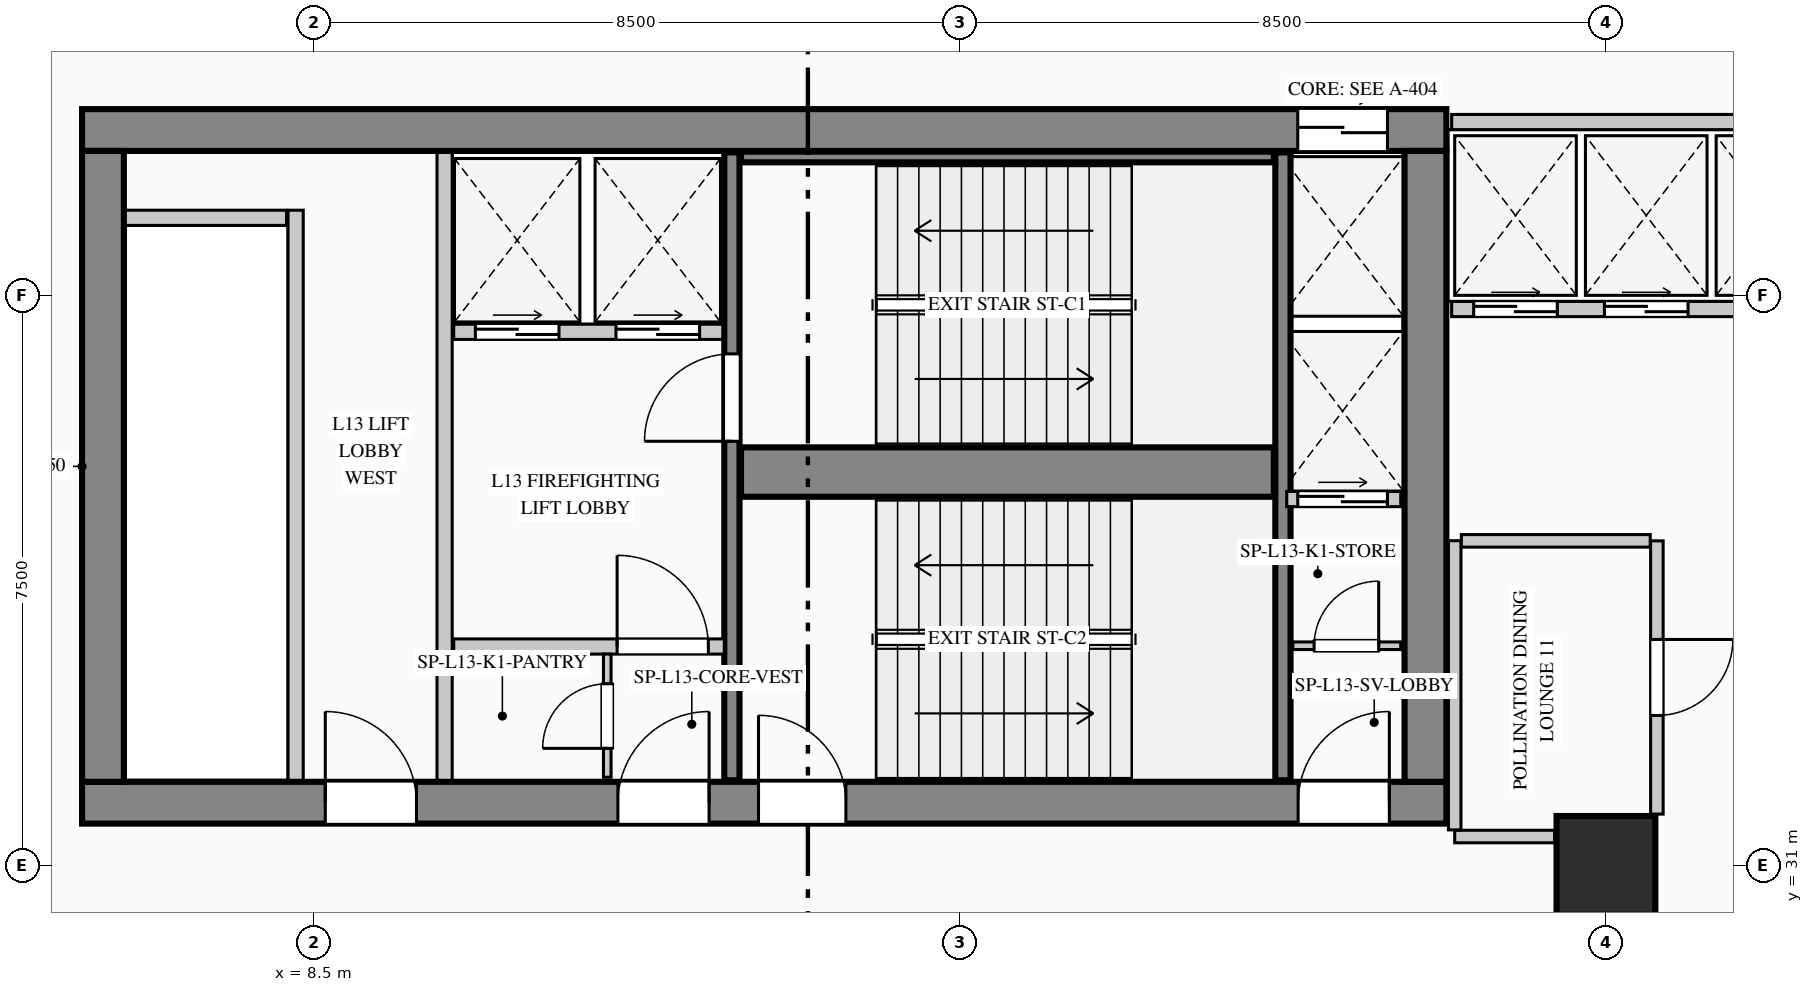
"""IFC4 building model, lengths in metres.
Left out: names, types, materials, properties, quantities, classifications, styles, units other than length and angle.
Written with IfcOpenShell. Run it as: python <this file> out.ifc"""

import sys

from ifc_helpers import new_model, si_unit, direction, frame, frame_2d, origin, origin_2d, place, context, subcontext, project, spatial, rectangle, extrude, element, fill, save


model = new_model("IFC4")
c1 = context("Model", 3, precision=1e-05, world=origin(), true_north=direction((0.0, 1.0)))
c2 = subcontext(c1, "Body", "Model", "MODEL_VIEW")
j1 = project(units=[si_unit("LENGTHUNIT", "METRE"), si_unit("PLANEANGLEUNIT", "RADIAN")], contexts=[c1])
p1 = place(None, origin())
s1 = spatial("IfcSite", under=j1, at=p1, CompositionType="ELEMENT")
p2 = place(p1, origin())
s2 = spatial("IfcBuilding", under=s1, at=p2, CompositionType="ELEMENT")
p3 = place(p2, frame((0.0, 0.0, 57.8)))
s3 = spatial("IfcBuildingStorey", under=s2, at=p3, CompositionType="ELEMENT", Elevation=57.8)
p4 = place(p3, frame((5.45, 40.675, 0.0), z_axis=(0.0, 0.0, 1.0), x_axis=(1.0, 0.0, 0.0)))
e1 = element("IfcWall", 1, at=p4, inside=s3, PredefinedType="SHEAR", context=c2, shape_type="SweptSolid", body=[
    extrude(rectangle(XDim=17.95, YDim=0.55, at=frame_2d((8.975, 0.0))), origin(), (0.0, 0.0, 1.0), 4.4),
])
p5 = place(p4, frame((15.995, 0.0, 0.0)))
e2 = element("IfcOpeningElement", 2, at=p5, cuts=e1, PredefinedType="OPENING", context=c2, shape_type="SweptSolid", body=[
    extrude(rectangle(XDim=1.18, YDim=2.25, at=frame_2d((0.59, 1.125))), frame((0.0, 0.285, 0.0), z_axis=(0.0, -1.0, 0.0), x_axis=(1.0, 0.0, 0.0)), (0.0, 0.0, 1.0), 0.57),
])
p6 = place(p3, frame((5.45, 31.825, 0.0), z_axis=(0.0, 0.0, 1.0), x_axis=(1.0, 0.0, 0.0)))
e3 = element("IfcWall", 3, at=p6, inside=s3, PredefinedType="SHEAR", context=c2, shape_type="SweptSolid", body=[
    extrude(rectangle(XDim=17.95, YDim=0.55, at=frame_2d((8.975, 0.0))), origin(), (0.0, 0.0, 1.0), 4.4),
])
p7 = place(p6, frame((3.2, 0.0, 0.0)))
e4 = element("IfcOpeningElement", 4, at=p7, cuts=e3, PredefinedType="OPENING", context=c2, shape_type="SweptSolid", body=[
    extrude(rectangle(XDim=1.2, YDim=2.2, at=frame_2d((0.6, 1.1))), frame((0.0, 0.285, 0.0), z_axis=(0.0, -1.0, 0.0), x_axis=(1.0, 0.0, 0.0)), (0.0, 0.0, 1.0), 0.57),
])
p8 = place(p6, frame((7.05, 0.0, 0.0)))
e5 = element("IfcOpeningElement", 5, at=p8, cuts=e3, PredefinedType="OPENING", context=c2, shape_type="SweptSolid", body=[
    extrude(rectangle(XDim=1.2, YDim=2.2, at=frame_2d((0.6, 1.1))), frame((0.0, 0.285, 0.0), z_axis=(0.0, -1.0, 0.0), x_axis=(1.0, 0.0, 0.0)), (0.0, 0.0, 1.0), 0.57),
])
p9 = place(p6, frame((8.9, 0.0, 0.0)))
e6 = element("IfcOpeningElement", 6, at=p9, cuts=e3, PredefinedType="OPENING", context=c2, shape_type="SweptSolid", body=[
    extrude(rectangle(XDim=1.15, YDim=2.2, at=frame_2d((0.575, 1.1))), frame((0.0, 0.285, 0.0), z_axis=(0.0, -1.0, 0.0), x_axis=(1.0, 0.0, 0.0)), (0.0, 0.0, 1.0), 0.57),
])
p10 = place(p6, frame((16.0, 0.0, 0.0)))
e7 = element("IfcOpeningElement", 7, at=p10, cuts=e3, PredefinedType="OPENING", context=c2, shape_type="SweptSolid", body=[
    extrude(rectangle(XDim=1.2, YDim=2.2, at=frame_2d((0.6, 1.1))), frame((0.0, 0.285, 0.0), z_axis=(0.0, -1.0, 0.0), x_axis=(1.0, 0.0, 0.0)), (0.0, 0.0, 1.0), 0.57),
])
for number, where, z_axis, x_axis in (
    (8, (5.725, 32.1, 0.0), (0.0, 0.0, 1.0), (0.0, 1.0, 0.0)),
    (9, (23.125, 32.1, 0.0), (0.0, 0.0, 1.0), (0.0, 1.0, 0.0)),
):
    element("IfcWall", number, at=place(p3, frame(where, z_axis=z_axis, x_axis=x_axis)), inside=s3, PredefinedType="SHEAR", context=c2, shape_type="SweptSolid", body=[
        extrude(rectangle(XDim=8.3, YDim=0.55, at=frame_2d((4.15, 0.0))), origin(), (0.0, 0.0, 1.0), 4.4),
    ])
p11 = place(p3, frame((14.0, 32.12, 0.0), z_axis=(0.0, 0.0, 1.0), x_axis=(0.0, 1.0, 0.0)))
e10 = element("IfcWall", 10, at=p11, inside=s3, PredefinedType="SHEAR", context=c2, shape_type="SweptSolid", body=[
    extrude(rectangle(XDim=8.26, YDim=0.2, at=frame_2d((4.13, 0.0))), origin(), (0.0, 0.0, 1.0), 4.4),
])
p12 = place(p11, frame((4.46, 0.0, 0.0)))
e11 = element("IfcOpeningElement", 11, at=p12, cuts=e10, PredefinedType="OPENING", context=c2, shape_type="SweptSolid", body=[
    extrude(rectangle(XDim=1.15, YDim=2.2, at=frame_2d((0.575, 1.1))), frame((0.0, 0.11, 0.0), z_axis=(0.0, -1.0, 0.0), x_axis=(1.0, 0.0, 0.0)), (0.0, 0.0, 1.0), 0.22),
])
p13 = place(p3, frame((14.12, 36.175, 0.0), z_axis=(0.0, 0.0, 1.0), x_axis=(1.0, 0.0, 0.0)))
e12 = element("IfcWall", 12, at=p13, inside=s3, PredefinedType="SHEAR", context=c2, shape_type="SweptSolid", body=[
    extrude(rectangle(XDim=7.01, YDim=0.65, at=frame_2d((3.505, 0.0))), origin(), (0.0, 0.0, 1.0), 4.4),
])
p14 = place(p3, frame((21.25, 32.12, 0.0), z_axis=(0.0, 0.0, 1.0), x_axis=(0.0, 1.0, 0.0)))
e13 = element("IfcWall", 13, at=p14, inside=s3, PredefinedType="SHEAR", context=c2, shape_type="SweptSolid", body=[
    extrude(rectangle(XDim=8.26, YDim=0.2, at=frame_2d((4.13, 0.0))), origin(), (0.0, 0.0, 1.0), 4.4),
])
p15 = place(p3, frame((14.12, 40.32, 0.0), z_axis=(0.0, 0.0, 1.0), x_axis=(1.0, 0.0, 0.0)))
e14 = element("IfcWall", 14, at=p15, inside=s3, PredefinedType="SHEAR", context=c2, shape_type="SweptSolid", body=[
    extrude(rectangle(XDim=7.01, YDim=0.14, at=frame_2d((3.505, 0.0))), origin(), (0.0, 0.0, 1.0), 4.4),
])
p16 = place(p3, frame((25.5, 31.0, 0.0), z_axis=(0.0, 0.0, 1.0), x_axis=(1.0, 0.0, 0.0)))
e15 = element("IfcColumn", 15, at=p16, inside=s3, PredefinedType="COLUMN", context=c2, shape_type="SweptSolid", body=[
    extrude(rectangle(XDim=1.3, YDim=1.3, at=origin_2d()), origin(), (0.0, 0.0, 1.0), 4.4),
])
p17 = place(p3, frame((8.523, 4.84, 0.0), z_axis=(0.0, 0.0, 1.0), x_axis=(-0.150394554312, 0.988626055712, 0.0)))
e16 = element("IfcWall", 16, at=p17, inside=s3, PredefinedType="STANDARD", context=c2, shape_type="SweptSolid", body=[
    extrude(rectangle(XDim=36.738, YDim=0.28, at=frame_2d((18.369, 0.0))), origin(), (0.0, 0.0, 1.0), 4.1),
])
p18 = place(p17, frame((22.762, 0.0, 0.9)))
e17 = element("IfcOpeningElement", 17, at=p18, cuts=e16, PredefinedType="OPENING", context=c2, shape_type="SweptSolid", body=[
    extrude(rectangle(XDim=1.5, YDim=1.8, at=frame_2d((0.75, 0.9))), frame((0.0, 0.15, 0.0), z_axis=(0.0, -1.0, 0.0), x_axis=(1.0, 0.0, 0.0)), (0.0, 0.0, 1.0), 0.3),
])
p19 = place(p3, frame((8.26, 32.12, 0.0), z_axis=(0.0, 0.0, 1.0), x_axis=(0.0, 1.0, 0.0)))
e18 = element("IfcWall", 18, at=p19, inside=s3, PredefinedType="PARTITIONING", context=c2, shape_type="SweptSolid", body=[
    extrude(rectangle(XDim=7.5, YDim=0.2, at=frame_2d((3.75, 0.0))), origin(), (0.0, 0.0, 1.0), 4.1),
])
p20 = place(p3, frame((6.02, 39.52, 0.0), z_axis=(0.0, 0.0, 1.0), x_axis=(1.0, 0.0, 0.0)))
e19 = element("IfcWall", 19, at=p20, inside=s3, PredefinedType="PARTITIONING", context=c2, shape_type="SweptSolid", body=[
    extrude(rectangle(XDim=2.12, YDim=0.2, at=frame_2d((1.06, 0.0))), origin(), (0.0, 0.0, 1.0), 4.1),
])
p21 = place(p3, frame((10.22, 32.12, 0.0), z_axis=(0.0, 0.0, 1.0), x_axis=(0.0, 1.0, 0.0)))
e20 = element("IfcWall", 20, at=p21, inside=s3, PredefinedType="PARTITIONING", context=c2, shape_type="SweptSolid", body=[
    extrude(rectangle(XDim=8.26, YDim=0.2, at=frame_2d((4.13, 0.0))), origin(), (0.0, 0.0, 1.0), 4.1),
])
p22 = place(p3, frame((10.34, 38.02, 0.0), z_axis=(0.0, 0.0, 1.0), x_axis=(1.0, 0.0, 0.0)))
e21 = element("IfcWall", 21, at=p22, inside=s3, PredefinedType="PARTITIONING", context=c2, shape_type="SweptSolid", body=[
    extrude(rectangle(XDim=3.54, YDim=0.2, at=frame_2d((1.77, 0.0))), origin(), (0.0, 0.0, 1.0), 4.1),
])
p23 = place(p22, frame((0.285, 0.0, 0.0)))
e22 = element("IfcOpeningElement", 22, at=p23, cuts=e21, PredefinedType="OPENING", context=c2, shape_type="SweptSolid", body=[
    extrude(rectangle(XDim=1.1, YDim=2.2, at=frame_2d((0.55, 1.1))), frame((0.0, 0.11, 0.0), z_axis=(0.0, -1.0, 0.0), x_axis=(1.0, 0.0, 0.0)), (0.0, 0.0, 1.0), 0.22),
])
p24 = place(p22, frame((2.135, 0.0, 0.0)))
e23 = element("IfcOpeningElement", 23, at=p24, cuts=e21, PredefinedType="OPENING", context=c2, shape_type="SweptSolid", body=[
    extrude(rectangle(XDim=1.1, YDim=2.2, at=frame_2d((0.55, 1.1))), frame((0.0, 0.11, 0.0), z_axis=(0.0, -1.0, 0.0), x_axis=(1.0, 0.0, 0.0)), (0.0, 0.0, 1.0), 0.22),
])
p25 = place(p3, frame((10.34, 33.88, 0.0), z_axis=(0.0, 0.0, 1.0), x_axis=(1.0, 0.0, 0.0)))
e24 = element("IfcWall", 24, at=p25, inside=s3, PredefinedType="PARTITIONING", context=c2, shape_type="SweptSolid", body=[
    extrude(rectangle(XDim=3.56, YDim=0.2, at=frame_2d((1.78, 0.0))), origin(), (0.0, 0.0, 1.0), 4.1),
])
p26 = place(p25, frame((2.15, 0.0, 0.0)))
e25 = element("IfcOpeningElement", 25, at=p26, cuts=e24, PredefinedType="OPENING", context=c2, shape_type="SweptSolid", body=[
    extrude(rectangle(XDim=1.2, YDim=2.2, at=frame_2d((0.6, 1.1))), frame((0.0, 0.11, 0.0), z_axis=(0.0, -1.0, 0.0), x_axis=(1.0, 0.0, 0.0)), (0.0, 0.0, 1.0), 0.22),
])
p27 = place(p3, frame((12.36, 32.16, 0.0), z_axis=(0.0, 0.0, 1.0), x_axis=(0.0, 1.0, 0.0)))
e26 = element("IfcWall", 26, at=p27, inside=s3, PredefinedType="PARTITIONING", context=c2, shape_type="SweptSolid", body=[
    extrude(rectangle(XDim=1.62, YDim=0.1, at=frame_2d((0.81, 0.0))), origin(), (0.0, 0.0, 1.0), 4.1),
])
p28 = place(p27, frame((0.38, 0.0, 0.0)))
e27 = element("IfcOpeningElement", 27, at=p28, cuts=e26, PredefinedType="OPENING", context=c2, shape_type="SweptSolid", body=[
    extrude(rectangle(XDim=0.85, YDim=2.1, at=frame_2d((0.425, 1.05))), frame((0.0, 0.06, 0.0), z_axis=(0.0, -1.0, 0.0), x_axis=(1.0, 0.0, 0.0)), (0.0, 0.0, 1.0), 0.12),
])
p29 = place(p3, frame((21.38, 33.89, 0.0), z_axis=(0.0, 0.0, 1.0), x_axis=(1.0, 0.0, 0.0)))
e28 = element("IfcWall", 28, at=p29, inside=s3, PredefinedType="PARTITIONING", context=c2, shape_type="SweptSolid", body=[
    extrude(rectangle(XDim=1.42, YDim=0.1, at=frame_2d((0.71, 0.0))), origin(), (0.0, 0.0, 1.0), 4.1),
])
p30 = place(p29, frame((0.28, 0.0, 0.0)))
e29 = element("IfcOpeningElement", 29, at=p30, cuts=e28, PredefinedType="OPENING", context=c2, shape_type="SweptSolid", body=[
    extrude(rectangle(XDim=0.85, YDim=2.1, at=frame_2d((0.425, 1.05))), frame((0.0, 0.06, 0.0), z_axis=(0.0, -1.0, 0.0), x_axis=(1.0, 0.0, 0.0)), (0.0, 0.0, 1.0), 0.12),
])
p31 = place(p3, frame((21.3, 35.82, 0.0), z_axis=(0.0, 0.0, 1.0), x_axis=(1.0, 0.0, 0.0)))
e30 = element("IfcWall", 30, at=p31, inside=s3, PredefinedType="PARTITIONING", context=c2, shape_type="SweptSolid", body=[
    extrude(rectangle(XDim=1.5, YDim=0.2, at=frame_2d((0.75, 0.0))), origin(), (0.0, 0.0, 1.0), 4.1),
])
p32 = place(p31, frame((0.145, 0.0, 0.0)))
e31 = element("IfcOpeningElement", 31, at=p32, cuts=e30, PredefinedType="OPENING", context=c2, shape_type="SweptSolid", body=[
    extrude(rectangle(XDim=1.18, YDim=2.25, at=frame_2d((0.59, 1.125))), frame((0.0, 0.11, 0.0), z_axis=(0.0, -1.0, 0.0), x_axis=(1.0, 0.0, 0.0)), (0.0, 0.0, 1.0), 0.22),
])
p33 = place(p3, frame((23.47, 40.78, 0.0), z_axis=(0.0, 0.0, 1.0), x_axis=(1.0, 0.0, 0.0)))
e32 = element("IfcWall", 32, at=p33, inside=s3, PredefinedType="PARTITIONING", context=c2, shape_type="SweptSolid", body=[
    extrude(rectangle(XDim=6.91, YDim=0.2, at=frame_2d((3.455, 0.0))), origin(), (0.0, 0.0, 1.0), 4.1),
])
p34 = place(p3, frame((23.47, 38.32, 0.0), z_axis=(0.0, 0.0, 1.0), x_axis=(1.0, 0.0, 0.0)))
e33 = element("IfcWall", 33, at=p34, inside=s3, PredefinedType="PARTITIONING", context=c2, shape_type="SweptSolid", body=[
    extrude(rectangle(XDim=6.79, YDim=0.2, at=frame_2d((3.395, 0.0))), origin(), (0.0, 0.0, 1.0), 4.1),
])
p35 = place(p34, frame((0.29, 0.0, 0.0)))
e34 = element("IfcOpeningElement", 34, at=p35, cuts=e33, PredefinedType="OPENING", context=c2, shape_type="SweptSolid", body=[
    extrude(rectangle(XDim=1.1, YDim=2.2, at=frame_2d((0.55, 1.1))), frame((0.0, 0.11, 0.0), z_axis=(0.0, -1.0, 0.0), x_axis=(1.0, 0.0, 0.0)), (0.0, 0.0, 1.0), 0.22),
])
p36 = place(p34, frame((2.01, 0.0, 0.0)))
e35 = element("IfcOpeningElement", 35, at=p36, cuts=e33, PredefinedType="OPENING", context=c2, shape_type="SweptSolid", body=[
    extrude(rectangle(XDim=1.1, YDim=2.2, at=frame_2d((0.55, 1.1))), frame((0.0, 0.11, 0.0), z_axis=(0.0, -1.0, 0.0), x_axis=(1.0, 0.0, 0.0)), (0.0, 0.0, 1.0), 0.22),
])
p37 = place(p34, frame((3.73, 0.0, 0.0)))
e36 = element("IfcOpeningElement", 36, at=p37, cuts=e33, PredefinedType="OPENING", context=c2, shape_type="SweptSolid", body=[
    extrude(rectangle(XDim=1.1, YDim=2.2, at=frame_2d((0.55, 1.1))), frame((0.0, 0.11, 0.0), z_axis=(0.0, -1.0, 0.0), x_axis=(1.0, 0.0, 0.0)), (0.0, 0.0, 1.0), 0.22),
])
p38 = place(p34, frame((5.45, 0.0, 0.0)))
e37 = element("IfcOpeningElement", 37, at=p38, cuts=e33, PredefinedType="OPENING", context=c2, shape_type="SweptSolid", body=[
    extrude(rectangle(XDim=1.1, YDim=2.2, at=frame_2d((0.55, 1.1))), frame((0.0, 0.11, 0.0), z_axis=(0.0, -1.0, 0.0), x_axis=(1.0, 0.0, 0.0)), (0.0, 0.0, 1.0), 0.22),
])
p39 = place(p3, frame((26.17, 35.27, 0.0), z_axis=(0.0, 0.0, 1.0), x_axis=(0.0, -1.0, 0.0)))
e38 = element("IfcWall", 38, at=p39, inside=s3, PredefinedType="PARTITIONING", context=c2, shape_type="SweptSolid", body=[
    extrude(rectangle(XDim=3.595, YDim=0.165, at=frame_2d((1.797, 0.0))), origin(), (0.0, 0.0, 1.0), 4.1),
])
p40 = place(p39, frame((1.298, 0.0, 0.0)))
e39 = element("IfcOpeningElement", 39, at=p40, cuts=e38, PredefinedType="OPENING", context=c2, shape_type="SweptSolid", body=[
    extrude(rectangle(XDim=1.0, YDim=2.15, at=frame_2d((0.5, 1.075))), frame((0.0, 0.093, 0.0), z_axis=(0.0, -1.0, 0.0), x_axis=(1.0, 0.0, 0.0)), (0.0, 0.0, 1.0), 0.185),
])
p41 = place(p3, frame((24.825, 31.38, 0.0), z_axis=(0.0, 0.0, 1.0), x_axis=(-1.0, 0.0, 0.0)))
e40 = element("IfcWall", 40, at=p41, inside=s3, PredefinedType="PARTITIONING", context=c2, shape_type="SweptSolid", body=[
    extrude(rectangle(XDim=1.315, YDim=0.165, at=frame_2d((0.657, 0.0))), origin(), (0.0, 0.0, 1.0), 4.1),
])
p42 = place(p3, frame((23.51, 31.468, 0.0), z_axis=(0.0, 0.0, 1.0), x_axis=(0.0, 1.0, 0.0)))
e41 = element("IfcWall", 41, at=p42, inside=s3, PredefinedType="PARTITIONING", context=c2, shape_type="SweptSolid", body=[
    extrude(rectangle(XDim=3.804, YDim=0.165, at=frame_2d((1.902, 0.0))), origin(), (0.0, 0.0, 1.0), 4.1),
])
p43 = place(p3, frame((23.597, 35.27, 0.0), z_axis=(0.0, 0.0, 1.0), x_axis=(1.0, 0.0, 0.0)))
e42 = element("IfcWall", 42, at=p43, inside=s3, PredefinedType="PARTITIONING", context=c2, shape_type="SweptSolid", body=[
    extrude(rectangle(XDim=2.485, YDim=0.165, at=frame_2d((1.243, 0.0))), origin(), (0.0, 0.0, 1.0), 4.1),
])
p44 = place(p7, origin())
e43 = element("IfcDoor", 43, at=p44, inside=s3, OperationType="SINGLE_SWING_LEFT", PredefinedType="DOOR", context=c2, shape_type="SweptSolid", body=[
    extrude(rectangle(XDim=1.2, YDim=2.2, at=frame_2d((0.6, 1.1))), frame((0.0, 0.025, 0.0), z_axis=(0.0, -1.0, 0.0), x_axis=(1.0, 0.0, 0.0)), (0.0, 0.0, 1.0), 0.05),
])
fill(e4, e43)
p45 = place(p8, origin())
e44 = element("IfcDoor", 44, at=p45, inside=s3, OperationType="SINGLE_SWING_RIGHT", PredefinedType="DOOR", context=c2, shape_type="SweptSolid", body=[
    extrude(rectangle(XDim=1.2, YDim=2.2, at=frame_2d((0.6, 1.1))), frame((0.0, 0.025, 0.0), z_axis=(0.0, -1.0, 0.0), x_axis=(1.0, 0.0, 0.0)), (0.0, 0.0, 1.0), 0.05),
])
fill(e5, e44)
p46 = place(p9, origin())
e45 = element("IfcDoor", 45, at=p46, inside=s3, OperationType="SINGLE_SWING_LEFT", PredefinedType="DOOR", context=c2, shape_type="SweptSolid", body=[
    extrude(rectangle(XDim=1.15, YDim=2.2, at=frame_2d((0.575, 1.1))), frame((0.0, 0.025, 0.0), z_axis=(0.0, -1.0, 0.0), x_axis=(1.0, 0.0, 0.0)), (0.0, 0.0, 1.0), 0.05),
])
fill(e6, e45)
p47 = place(p10, origin())
e46 = element("IfcDoor", 46, at=p47, inside=s3, OperationType="SINGLE_SWING_RIGHT", PredefinedType="DOOR", context=c2, shape_type="SweptSolid", body=[
    extrude(rectangle(XDim=1.2, YDim=2.2, at=frame_2d((0.6, 1.1))), frame((0.0, 0.025, 0.0), z_axis=(0.0, -1.0, 0.0), x_axis=(1.0, 0.0, 0.0)), (0.0, 0.0, 1.0), 0.05),
])
fill(e7, e46)
p48 = place(p26, origin())
e47 = element("IfcDoor", 47, at=p48, inside=s3, OperationType="SINGLE_SWING_LEFT", PredefinedType="DOOR", context=c2, shape_type="SweptSolid", body=[
    extrude(rectangle(XDim=1.2, YDim=2.2, at=frame_2d((0.6, 1.1))), frame((0.0, 0.025, 0.0), z_axis=(0.0, -1.0, 0.0), x_axis=(1.0, 0.0, 0.0)), (0.0, 0.0, 1.0), 0.05),
])
fill(e25, e47)
p49 = place(p28, origin())
e48 = element("IfcDoor", 48, at=p49, inside=s3, OperationType="SINGLE_SWING_LEFT", PredefinedType="DOOR", context=c2, shape_type="SweptSolid", body=[
    extrude(rectangle(XDim=0.85, YDim=2.1, at=frame_2d((0.425, 1.05))), frame((0.0, 0.025, 0.0), z_axis=(0.0, -1.0, 0.0), x_axis=(1.0, 0.0, 0.0)), (0.0, 0.0, 1.0), 0.05),
])
fill(e27, e48)
p50 = place(p30, origin())
e49 = element("IfcDoor", 49, at=p50, inside=s3, OperationType="SINGLE_SWING_RIGHT", PredefinedType="DOOR", context=c2, shape_type="SweptSolid", body=[
    extrude(rectangle(XDim=0.85, YDim=2.1, at=frame_2d((0.425, 1.05))), frame((0.0, 0.025, 0.0), z_axis=(0.0, -1.0, 0.0), x_axis=(1.0, 0.0, 0.0)), (0.0, 0.0, 1.0), 0.05),
])
fill(e29, e49)
p51 = place(p12, origin())
e50 = element("IfcDoor", 50, at=p51, inside=s3, OperationType="SINGLE_SWING_LEFT", PredefinedType="DOOR", context=c2, shape_type="SweptSolid", body=[
    extrude(rectangle(XDim=1.15, YDim=2.2, at=frame_2d((0.575, 1.1))), frame((0.0, 0.025, 0.0), z_axis=(0.0, -1.0, 0.0), x_axis=(1.0, 0.0, 0.0)), (0.0, 0.0, 1.0), 0.05),
])
fill(e11, e50)
p52 = place(p23, origin())
e51 = element("IfcDoor", 51, at=p52, inside=s3, OperationType="DOUBLE_DOOR_SLIDING", PredefinedType="DOOR", context=c2, shape_type="SweptSolid", body=[
    extrude(rectangle(XDim=1.1, YDim=2.2, at=frame_2d((0.55, 1.1))), frame((0.0, 0.025, 0.0), z_axis=(0.0, -1.0, 0.0), x_axis=(1.0, 0.0, 0.0)), (0.0, 0.0, 1.0), 0.05),
])
fill(e22, e51)
p53 = place(p24, origin())
e52 = element("IfcDoor", 52, at=p53, inside=s3, OperationType="DOUBLE_DOOR_SLIDING", PredefinedType="DOOR", context=c2, shape_type="SweptSolid", body=[
    extrude(rectangle(XDim=1.1, YDim=2.2, at=frame_2d((0.55, 1.1))), frame((0.0, 0.025, 0.0), z_axis=(0.0, -1.0, 0.0), x_axis=(1.0, 0.0, 0.0)), (0.0, 0.0, 1.0), 0.05),
])
fill(e23, e52)
p54 = place(p5, origin())
e53 = element("IfcDoor", 53, at=p54, inside=s3, OperationType="DOUBLE_DOOR_SLIDING", PredefinedType="DOOR", context=c2, shape_type="SweptSolid", body=[
    extrude(rectangle(XDim=1.18, YDim=2.25, at=frame_2d((0.59, 1.125))), frame((0.0, 0.025, 0.0), z_axis=(0.0, -1.0, 0.0), x_axis=(1.0, 0.0, 0.0)), (0.0, 0.0, 1.0), 0.05),
])
fill(e2, e53)
p55 = place(p32, origin())
e54 = element("IfcDoor", 54, at=p55, inside=s3, OperationType="DOUBLE_DOOR_SLIDING", PredefinedType="DOOR", context=c2, shape_type="SweptSolid", body=[
    extrude(rectangle(XDim=1.18, YDim=2.25, at=frame_2d((0.59, 1.125))), frame((0.0, 0.025, 0.0), z_axis=(0.0, -1.0, 0.0), x_axis=(1.0, 0.0, 0.0)), (0.0, 0.0, 1.0), 0.05),
])
fill(e31, e54)
p56 = place(p35, origin())
e55 = element("IfcDoor", 55, at=p56, inside=s3, OperationType="DOUBLE_DOOR_SLIDING", PredefinedType="DOOR", context=c2, shape_type="SweptSolid", body=[
    extrude(rectangle(XDim=1.1, YDim=2.2, at=frame_2d((0.55, 1.1))), frame((0.0, 0.025, 0.0), z_axis=(0.0, -1.0, 0.0), x_axis=(1.0, 0.0, 0.0)), (0.0, 0.0, 1.0), 0.05),
])
fill(e34, e55)
p57 = place(p36, origin())
e56 = element("IfcDoor", 56, at=p57, inside=s3, OperationType="DOUBLE_DOOR_SLIDING", PredefinedType="DOOR", context=c2, shape_type="SweptSolid", body=[
    extrude(rectangle(XDim=1.1, YDim=2.2, at=frame_2d((0.55, 1.1))), frame((0.0, 0.025, 0.0), z_axis=(0.0, -1.0, 0.0), x_axis=(1.0, 0.0, 0.0)), (0.0, 0.0, 1.0), 0.05),
])
fill(e35, e56)
p58 = place(p40, origin())
e57 = element("IfcDoor", 57, at=p58, inside=s3, OperationType="SINGLE_SWING_LEFT", PredefinedType="DOOR", context=c2, shape_type="SweptSolid", body=[
    extrude(rectangle(XDim=1.0, YDim=2.15, at=frame_2d((0.5, 1.075))), frame((0.0, 0.025, 0.0), z_axis=(0.0, -1.0, 0.0), x_axis=(1.0, 0.0, 0.0)), (0.0, 0.0, 1.0), 0.05),
])
fill(e39, e57)
save(model, sys.argv[1])
